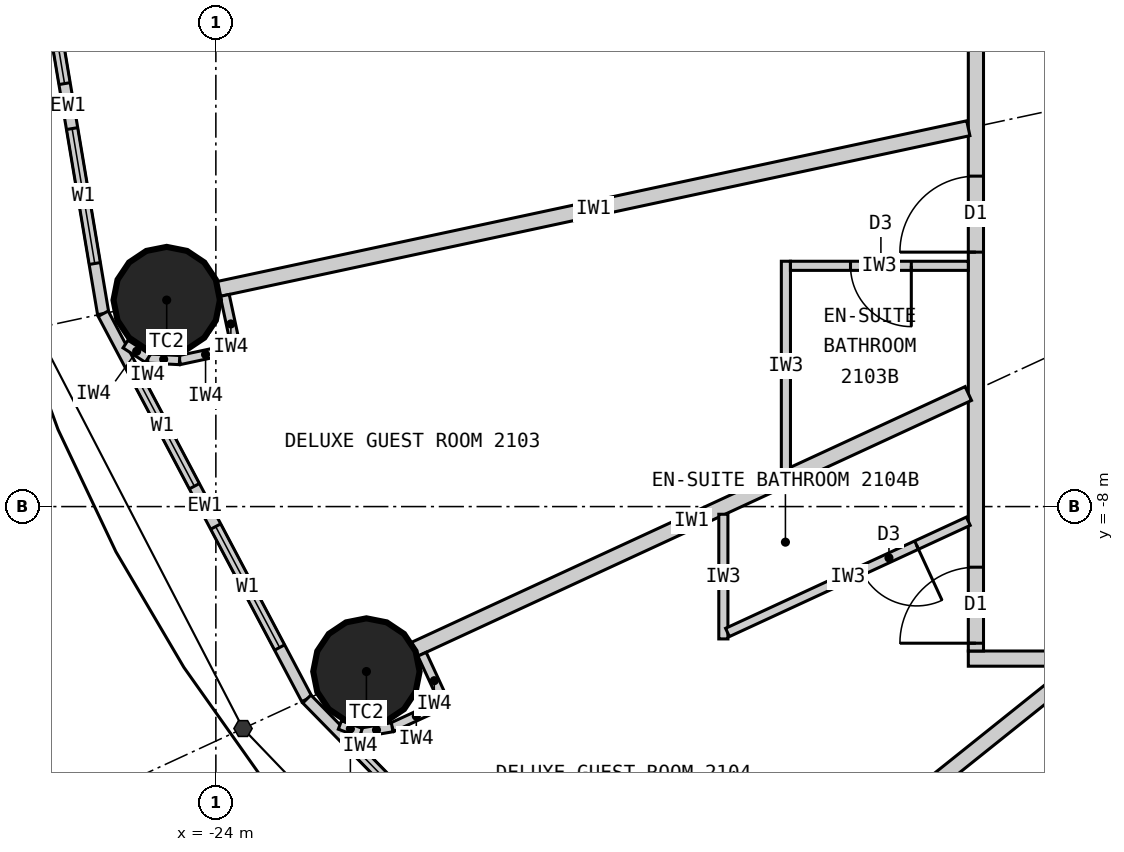
"""IFC4 building model, lengths in metres.
Left out: names, types, materials, properties, quantities, classifications, styles, units other than length and angle.
Written with IfcOpenShell. Run it as: python <this file> out.ifc"""

import sys

from ifc_helpers import new_model, si_unit, direction, frame, frame_2d, origin, origin_2d, place, context, subcontext, project, spatial, rectangle, circle, extrude, element, fill, save


model = new_model("IFC4")
c1 = context("Model", 3, precision=1e-05, world=origin(), true_north=direction((0.0, 1.0)))
c2 = subcontext(c1, "Body", "Model", "MODEL_VIEW")
j1 = project(units=[si_unit("LENGTHUNIT", "METRE"), si_unit("PLANEANGLEUNIT", "RADIAN")], contexts=[c1])
p1 = place(None, origin())
s1 = spatial("IfcSite", under=j1, at=p1, CompositionType="ELEMENT")
p2 = place(p1, origin())
s2 = spatial("IfcBuilding", under=s1, at=p2, CompositionType="ELEMENT")
p3 = place(p2, frame((0.0, 0.0, 83.7)))
s3 = spatial("IfcBuildingStorey", under=s2, at=p3, CompositionType="ELEMENT", Elevation=83.7)
for number, where, z_axis, x_axis in (
    (1, (-24.647, -5.283, 0.0), (0.0, 0.0, 1.0), (1.0, 0.0, 0.0)),
    (2, (-22.019, -10.17, 0.0), (0.0, 0.0, 1.0), (1.0, 0.0, 0.0)),
):
    element("IfcColumn", number, at=place(p3, frame(where, z_axis=z_axis, x_axis=x_axis)), inside=s3, PredefinedType="COLUMN", context=c2, shape_type="SweptSolid", body=[
        extrude(circle(Radius=0.7, at=origin_2d()), origin(), (0.0, 0.0, 1.0), 3.3),
    ])
p4 = place(p3, frame((-26.4, 0.0, 0.0), z_axis=(0.0, 0.0, 1.0), x_axis=(0.165642551694, -0.986185857264, 0.0)))
e3 = element("IfcWall", 3, at=p4, inside=s3, PredefinedType="ELEMENTEDWALL", context=c2, shape_type="SweptSolid", body=[
    extrude(rectangle(XDim=5.539, YDim=0.15, at=frame_2d((2.77, 0.0))), origin(), (0.0, 0.0, 1.0), 3.12),
])
p5 = place(p4, frame((0.669, 0.0, 0.9)))
e4 = element("IfcOpeningElement", 4, at=p5, cuts=e3, PredefinedType="OPENING", context=c2, shape_type="SweptSolid", body=[
    extrude(rectangle(XDim=1.8, YDim=1.9, at=frame_2d((0.9, 0.95))), frame((0.0, 0.085, 0.0), z_axis=(0.0, -1.0, 0.0), x_axis=(1.0, 0.0, 0.0)), (0.0, 0.0, 1.0), 0.17),
])
p6 = place(p4, frame((3.07, 0.0, 0.9)))
e5 = element("IfcOpeningElement", 5, at=p6, cuts=e3, PredefinedType="OPENING", context=c2, shape_type="SweptSolid", body=[
    extrude(rectangle(XDim=1.8, YDim=1.9, at=frame_2d((0.9, 0.95))), frame((0.0, 0.085, 0.0), z_axis=(0.0, -1.0, 0.0), x_axis=(1.0, 0.0, 0.0)), (0.0, 0.0, 1.0), 0.17),
])
p7 = place(p3, frame((-25.482, -5.462, 0.0), z_axis=(0.0, 0.0, 1.0), x_axis=(0.467296867008, -0.884100468321, 0.0)))
e6 = element("IfcWall", 6, at=p7, inside=s3, PredefinedType="ELEMENTEDWALL", context=c2, shape_type="SweptSolid", body=[
    extrude(rectangle(XDim=5.734, YDim=0.15, at=frame_2d((2.867, 0.0))), origin(), (0.0, 0.0, 1.0), 3.12),
])
p8 = place(p7, frame((0.767, 0.0, 0.9)))
e7 = element("IfcOpeningElement", 7, at=p8, cuts=e6, PredefinedType="OPENING", context=c2, shape_type="SweptSolid", body=[
    extrude(rectangle(XDim=1.8, YDim=1.9, at=frame_2d((0.9, 0.95))), frame((0.0, 0.085, 0.0), z_axis=(0.0, -1.0, 0.0), x_axis=(1.0, 0.0, 0.0)), (0.0, 0.0, 1.0), 0.17),
])
p9 = place(p7, frame((3.167, 0.0, 0.9)))
e8 = element("IfcOpeningElement", 8, at=p9, cuts=e6, PredefinedType="OPENING", context=c2, shape_type="SweptSolid", body=[
    extrude(rectangle(XDim=1.8, YDim=1.9, at=frame_2d((0.9, 0.95))), frame((0.0, 0.085, 0.0), z_axis=(0.0, -1.0, 0.0), x_axis=(1.0, 0.0, 0.0)), (0.0, 0.0, 1.0), 0.17),
])
p10 = place(p3, frame((-22.803, -10.532, 0.0), z_axis=(0.0, 0.0, 1.0), x_axis=(0.699602905915, -0.714531856557, 0.0)))
e9 = element("IfcWall", 9, at=p10, inside=s3, PredefinedType="ELEMENTEDWALL", context=c2, shape_type="SweptSolid", body=[
    extrude(rectangle(XDim=6.051, YDim=0.15, at=frame_2d((3.025, 0.0))), origin(), (0.0, 0.0, 1.0), 3.12),
])
p11 = place(p10, frame((0.926, 0.0, 0.9)))
e10 = element("IfcOpeningElement", 10, at=p11, cuts=e9, PredefinedType="OPENING", context=c2, shape_type="SweptSolid", body=[
    extrude(rectangle(XDim=1.8, YDim=1.9, at=frame_2d((0.9, 0.95))), frame((0.0, 0.085, 0.0), z_axis=(0.0, -1.0, 0.0), x_axis=(1.0, 0.0, 0.0)), (0.0, 0.0, 1.0), 0.17),
])
p12 = place(p10, frame((3.325, 0.0, 0.9)))
e11 = element("IfcOpeningElement", 11, at=p12, cuts=e9, PredefinedType="OPENING", context=c2, shape_type="SweptSolid", body=[
    extrude(rectangle(XDim=1.8, YDim=1.9, at=frame_2d((0.9, 0.95))), frame((0.0, 0.085, 0.0), z_axis=(0.0, -1.0, 0.0), x_axis=(1.0, 0.0, 0.0)), (0.0, 0.0, 1.0), 0.17),
])
p13 = place(p3, frame((14.1, -10.0, 0.0), z_axis=(0.0, 0.0, 1.0), x_axis=(-1.0, 0.0, 0.0)))
e12 = element("IfcWall", 12, at=p13, inside=s3, PredefinedType="PARTITIONING", context=c2, shape_type="SweptSolid", body=[
    extrude(rectangle(XDim=28.2, YDim=0.2, at=frame_2d((14.1, 0.0))), origin(), (0.0, 0.0, 1.0), 3.12),
])
p14 = place(p13, frame((23.865, 0.0, 0.0)))
e13 = element("IfcOpeningElement", 13, at=p14, cuts=e12, PredefinedType="OPENING", context=c2, shape_type="SweptSolid", body=[
    extrude(rectangle(XDim=1.0, YDim=2.2, at=frame_2d((0.5, 1.1))), frame((0.0, 0.11, 0.0), z_axis=(0.0, -1.0, 0.0), x_axis=(1.0, 0.0, 0.0)), (0.0, 0.0, 1.0), 0.22),
])
p15 = place(p13, frame((18.529, 0.0, 0.0)))
e14 = element("IfcOpeningElement", 14, at=p15, cuts=e12, PredefinedType="OPENING", context=c2, shape_type="SweptSolid", body=[
    extrude(rectangle(XDim=1.0, YDim=2.2, at=frame_2d((0.5, 1.1))), frame((0.0, 0.11, 0.0), z_axis=(0.0, -1.0, 0.0), x_axis=(1.0, 0.0, 0.0)), (0.0, 0.0, 1.0), 0.22),
])
p16 = place(p13, frame((14.923, 0.0, 0.0)))
e15 = element("IfcOpeningElement", 15, at=p16, cuts=e12, PredefinedType="OPENING", context=c2, shape_type="SweptSolid", body=[
    extrude(rectangle(XDim=1.0, YDim=2.2, at=frame_2d((0.5, 1.1))), frame((0.0, 0.11, 0.0), z_axis=(0.0, -1.0, 0.0), x_axis=(1.0, 0.0, 0.0)), (0.0, 0.0, 1.0), 0.22),
])
p17 = place(p13, frame((2.801, 0.0, 0.0)))
e16 = element("IfcOpeningElement", 16, at=p17, cuts=e12, PredefinedType="OPENING", context=c2, shape_type="SweptSolid", body=[
    extrude(rectangle(XDim=1.0, YDim=2.2, at=frame_2d((0.5, 1.1))), frame((0.0, 0.11, 0.0), z_axis=(0.0, -1.0, 0.0), x_axis=(1.0, 0.0, 0.0)), (0.0, 0.0, 1.0), 0.22),
])
p18 = place(p3, frame((-14.0, 9.9, 0.0), z_axis=(0.0, 0.0, 1.0), x_axis=(0.0, -1.0, 0.0)))
e17 = element("IfcWall", 17, at=p18, inside=s3, PredefinedType="PARTITIONING", context=c2, shape_type="SweptSolid", body=[
    extrude(rectangle(XDim=19.8, YDim=0.2, at=frame_2d((9.9, 0.0))), origin(), (0.0, 0.0, 1.0), 3.12),
])
p19 = place(p18, frame((7.097, 0.0, 0.0)))
e18 = element("IfcOpeningElement", 18, at=p19, cuts=e17, PredefinedType="OPENING", context=c2, shape_type="SweptSolid", body=[
    extrude(rectangle(XDim=1.0, YDim=2.2, at=frame_2d((0.5, 1.1))), frame((0.0, 0.11, 0.0), z_axis=(0.0, -1.0, 0.0), x_axis=(1.0, 0.0, 0.0)), (0.0, 0.0, 1.0), 0.22),
])
p20 = place(p18, frame((10.778, 0.0, 0.0)))
e19 = element("IfcOpeningElement", 19, at=p20, cuts=e17, PredefinedType="OPENING", context=c2, shape_type="SweptSolid", body=[
    extrude(rectangle(XDim=1.0, YDim=2.2, at=frame_2d((0.5, 1.1))), frame((0.0, 0.11, 0.0), z_axis=(0.0, -1.0, 0.0), x_axis=(1.0, 0.0, 0.0)), (0.0, 0.0, 1.0), 0.22),
])
p21 = place(p18, frame((13.552, 0.0, 0.0)))
e20 = element("IfcOpeningElement", 20, at=p21, cuts=e17, PredefinedType="OPENING", context=c2, shape_type="SweptSolid", body=[
    extrude(rectangle(XDim=1.0, YDim=2.2, at=frame_2d((0.5, 1.1))), frame((0.0, 0.11, 0.0), z_axis=(0.0, -1.0, 0.0), x_axis=(1.0, 0.0, 0.0)), (0.0, 0.0, 1.0), 0.22),
])
p22 = place(p18, frame((18.698, 0.0, 0.0)))
e21 = element("IfcOpeningElement", 21, at=p22, cuts=e17, PredefinedType="OPENING", context=c2, shape_type="SweptSolid", body=[
    extrude(rectangle(XDim=1.0, YDim=2.2, at=frame_2d((0.5, 1.1))), frame((0.0, 0.11, 0.0), z_axis=(0.0, -1.0, 0.0), x_axis=(1.0, 0.0, 0.0)), (0.0, 0.0, 1.0), 0.22),
])
p23 = place(p18, frame((1.877, 0.0, 0.0)))
e22 = element("IfcOpeningElement", 22, at=p23, cuts=e17, PredefinedType="OPENING", context=c2, shape_type="SweptSolid", body=[
    extrude(rectangle(XDim=1.0, YDim=2.2, at=frame_2d((0.5, 1.1))), frame((0.0, 0.11, 0.0), z_axis=(0.0, -1.0, 0.0), x_axis=(1.0, 0.0, 0.0)), (0.0, 0.0, 1.0), 0.22),
])
p24 = place(p3, frame((-14.1, -3.022, 0.0), z_axis=(0.0, 0.0, 1.0), x_axis=(-0.977790014929, -0.209586943072, 0.0)))
e23 = element("IfcWall", 23, at=p24, inside=s3, PredefinedType="PARTITIONING", context=c2, shape_type="SweptSolid", body=[
    extrude(rectangle(XDim=10.087, YDim=0.2, at=frame_2d((5.043, 0.0))), origin(), (0.0, 0.0, 1.0), 2.32),
])
p25 = place(p3, frame((-14.1, -6.512, 0.0), z_axis=(0.0, 0.0, 1.0), x_axis=(-0.907832871056, -0.419332181247, 0.0)))
e24 = element("IfcWall", 24, at=p25, inside=s3, PredefinedType="PARTITIONING", context=c2, shape_type="SweptSolid", body=[
    extrude(rectangle(XDim=8.023, YDim=0.2, at=frame_2d((4.011, 0.0))), origin(), (0.0, 0.0, 1.0), 2.32),
])
p26 = place(p3, frame((-12.625, -10.1, 0.0), z_axis=(0.0, 0.0, 1.0), x_axis=(-0.780892451574, -0.624665493744, 0.0)))
e25 = element("IfcWall", 25, at=p26, inside=s3, PredefinedType="PARTITIONING", context=c2, shape_type="SweptSolid", body=[
    extrude(rectangle(XDim=6.045, YDim=0.2, at=frame_2d((3.022, 0.0))), origin(), (0.0, 0.0, 1.0), 2.32),
])
p27 = place(p3, frame((-16.5, -7.521, 0.0), z_axis=(0.0, 0.0, 1.0), x_axis=(0.0, 1.0, 0.0)))
e26 = element("IfcWall", 26, at=p27, inside=s3, PredefinedType="PARTITIONING", context=c2, shape_type="SweptSolid", body=[
    extrude(rectangle(XDim=2.749, YDim=0.12, at=frame_2d((1.374, 0.0))), origin(), (0.0, 0.0, 1.0), 3.12),
])
p28 = place(p3, frame((-14.1, -4.833, 0.0), z_axis=(0.0, 0.0, 1.0), x_axis=(-1.0, 0.0, 0.0)))
e27 = element("IfcWall", 27, at=p28, inside=s3, PredefinedType="PARTITIONING", context=c2, shape_type="SweptSolid", body=[
    extrude(rectangle(XDim=2.34, YDim=0.12, at=frame_2d((1.17, 0.0))), origin(), (0.0, 0.0, 1.0), 3.12),
])
p29 = place(p28, frame((0.75, 0.0, 0.0)))
e28 = element("IfcOpeningElement", 28, at=p29, cuts=e27, PredefinedType="OPENING", context=c2, shape_type="SweptSolid", body=[
    extrude(rectangle(XDim=0.8, YDim=2.1, at=frame_2d((0.4, 1.05))), frame((0.0, 0.07, 0.0), z_axis=(0.0, -1.0, 0.0), x_axis=(1.0, 0.0, 0.0)), (0.0, 0.0, 1.0), 0.14),
])
p30 = place(p3, frame((-17.323, -8.101, 0.0), z_axis=(0.0, 0.0, 1.0), x_axis=(0.0, -1.0, 0.0)))
e29 = element("IfcWall", 29, at=p30, inside=s3, PredefinedType="PARTITIONING", context=c2, shape_type="SweptSolid", body=[
    extrude(rectangle(XDim=1.64, YDim=0.12, at=frame_2d((0.82, 0.0))), origin(), (0.0, 0.0, 1.0), 3.12),
])
p31 = place(p3, frame((-14.1, -8.193, 0.0), z_axis=(0.0, 0.0, 1.0), x_axis=(-0.907836493557, -0.419324338628, 0.0)))
e30 = element("IfcWall", 30, at=p31, inside=s3, PredefinedType="PARTITIONING", context=c2, shape_type="SweptSolid", body=[
    extrude(rectangle(XDim=3.49, YDim=0.12, at=frame_2d((1.745, 0.0))), origin(), (0.0, 0.0, 1.0), 3.12),
])
p32 = place(p31, frame((0.75, 0.0, 0.0)))
e31 = element("IfcOpeningElement", 31, at=p32, cuts=e30, PredefinedType="OPENING", context=c2, shape_type="SweptSolid", body=[
    extrude(rectangle(XDim=0.8, YDim=2.1, at=frame_2d((0.4, 1.05))), frame((0.0, 0.07, 0.0), z_axis=(0.0, -1.0, 0.0), x_axis=(1.0, 0.0, 0.0)), (0.0, 0.0, 1.0), 0.14),
])
p33 = place(p3, frame((-23.883, -5.222, 0.0), z_axis=(0.0, 0.0, 1.0), x_axis=(0.209311842415, -0.977848941619, 0.0)))
e32 = element("IfcWall", 32, at=p33, inside=s3, PredefinedType="PARTITIONING", context=c2, shape_type="SweptSolid", body=[
    extrude(rectangle(XDim=0.768, YDim=0.12, at=frame_2d((0.384, 0.0))), origin(), (0.0, 0.0, 1.0), 3.12),
])
p34 = place(p3, frame((-23.793, -5.926, 0.0), z_axis=(0.0, 0.0, 1.0), x_axis=(-0.977792206673, -0.209576717621, 0.0)))
e33 = element("IfcWall", 33, at=p34, inside=s3, PredefinedType="PARTITIONING", context=c2, shape_type="SweptSolid", body=[
    extrude(rectangle(XDim=0.7, YDim=0.12, at=frame_2d((0.35, 0.0))), origin(), (0.0, 0.0, 1.0), 3.12),
])
p35 = place(p3, frame((-24.478, -6.073, 0.0), z_axis=(0.0, 0.0, 1.0), x_axis=(-0.998708262812, 0.05081147302, 0.0)))
e34 = element("IfcWall", 34, at=p35, inside=s3, PredefinedType="PARTITIONING", context=c2, shape_type="SweptSolid", body=[
    extrude(rectangle(XDim=0.418, YDim=0.12, at=frame_2d((0.209, 0.0))), origin(), (0.0, 0.0, 1.0), 3.12),
])
p36 = place(p3, frame((-24.895, -6.052, 0.0), z_axis=(0.0, 0.0, 1.0), x_axis=(-0.839495197275, 0.54336710772, 0.0)))
e35 = element("IfcWall", 35, at=p36, inside=s3, PredefinedType="PARTITIONING", context=c2, shape_type="SweptSolid", body=[
    extrude(rectangle(XDim=0.35, YDim=0.12, at=frame_2d((0.175, 0.0))), origin(), (0.0, 0.0, 1.0), 3.12),
])
p37 = place(p3, frame((-21.287, -9.942, 0.0), z_axis=(0.0, 0.0, 1.0), x_axis=(0.419259891039, -0.907866258744, 0.0)))
e36 = element("IfcWall", 36, at=p37, inside=s3, PredefinedType="PARTITIONING", context=c2, shape_type="SweptSolid", body=[
    extrude(rectangle(XDim=0.768, YDim=0.12, at=frame_2d((0.384, 0.0))), origin(), (0.0, 0.0, 1.0), 3.12),
])
p38 = place(p3, frame((-21.045, -10.61, 0.0), z_axis=(0.0, 0.0, 1.0), x_axis=(-0.907877701396, -0.419235112208, 0.0)))
e37 = element("IfcWall", 37, at=p38, inside=s3, PredefinedType="PARTITIONING", context=c2, shape_type="SweptSolid", body=[
    extrude(rectangle(XDim=0.7, YDim=0.12, at=frame_2d((0.35, 0.0))), origin(), (0.0, 0.0, 1.0), 3.12),
])
p39 = place(p3, frame((-21.68, -10.903, 0.0), z_axis=(0.0, 0.0, 1.0), x_axis=(-0.985446622073, -0.169985161247, 0.0)))
e38 = element("IfcWall", 38, at=p39, inside=s3, PredefinedType="PARTITIONING", context=c2, shape_type="SweptSolid", body=[
    extrude(rectangle(XDim=0.418, YDim=0.12, at=frame_2d((0.209, 0.0))), origin(), (0.0, 0.0, 1.0), 3.12),
])
p40 = place(p3, frame((-22.092, -10.974, 0.0), z_axis=(0.0, 0.0, 1.0), x_axis=(-0.938428160676, 0.345474437912, 0.0)))
e39 = element("IfcWall", 39, at=p40, inside=s3, PredefinedType="PARTITIONING", context=c2, shape_type="SweptSolid", body=[
    extrude(rectangle(XDim=0.294, YDim=0.12, at=frame_2d((0.147, 0.0))), origin(), (0.0, 0.0, 1.0), 3.12),
])
p41 = place(p5, origin())
e40 = element("IfcWindow", 40, at=p41, inside=s3, PartitioningType="SINGLE_PANEL", PredefinedType="WINDOW", context=c2, shape_type="SweptSolid", body=[
    extrude(rectangle(XDim=1.8, YDim=1.9, at=frame_2d((0.9, 0.95))), frame((0.0, 0.03, 0.0), z_axis=(0.0, -1.0, 0.0), x_axis=(1.0, 0.0, 0.0)), (0.0, 0.0, 1.0), 0.06),
])
fill(e4, e40)
p42 = place(p6, origin())
e41 = element("IfcWindow", 41, at=p42, inside=s3, PartitioningType="SINGLE_PANEL", PredefinedType="WINDOW", context=c2, shape_type="SweptSolid", body=[
    extrude(rectangle(XDim=1.8, YDim=1.9, at=frame_2d((0.9, 0.95))), frame((0.0, 0.03, 0.0), z_axis=(0.0, -1.0, 0.0), x_axis=(1.0, 0.0, 0.0)), (0.0, 0.0, 1.0), 0.06),
])
fill(e5, e41)
p43 = place(p8, origin())
e42 = element("IfcWindow", 42, at=p43, inside=s3, PartitioningType="SINGLE_PANEL", PredefinedType="WINDOW", context=c2, shape_type="SweptSolid", body=[
    extrude(rectangle(XDim=1.8, YDim=1.9, at=frame_2d((0.9, 0.95))), frame((0.0, 0.03, 0.0), z_axis=(0.0, -1.0, 0.0), x_axis=(1.0, 0.0, 0.0)), (0.0, 0.0, 1.0), 0.06),
])
fill(e7, e42)
p44 = place(p9, origin())
e43 = element("IfcWindow", 43, at=p44, inside=s3, PartitioningType="SINGLE_PANEL", PredefinedType="WINDOW", context=c2, shape_type="SweptSolid", body=[
    extrude(rectangle(XDim=1.8, YDim=1.9, at=frame_2d((0.9, 0.95))), frame((0.0, 0.03, 0.0), z_axis=(0.0, -1.0, 0.0), x_axis=(1.0, 0.0, 0.0)), (0.0, 0.0, 1.0), 0.06),
])
fill(e8, e43)
p45 = place(p11, origin())
e44 = element("IfcWindow", 44, at=p45, inside=s3, PartitioningType="SINGLE_PANEL", PredefinedType="WINDOW", context=c2, shape_type="SweptSolid", body=[
    extrude(rectangle(XDim=1.8, YDim=1.9, at=frame_2d((0.9, 0.95))), frame((0.0, 0.03, 0.0), z_axis=(0.0, -1.0, 0.0), x_axis=(1.0, 0.0, 0.0)), (0.0, 0.0, 1.0), 0.06),
])
fill(e10, e44)
p46 = place(p29, origin())
e45 = element("IfcDoor", 45, at=p46, inside=s3, OperationType="SINGLE_SWING_LEFT", PredefinedType="DOOR", context=c2, shape_type="SweptSolid", body=[
    extrude(rectangle(XDim=0.8, YDim=2.1, at=frame_2d((0.4, 1.05))), frame((0.0, 0.025, 0.0), z_axis=(0.0, -1.0, 0.0), x_axis=(1.0, 0.0, 0.0)), (0.0, 0.0, 1.0), 0.05),
])
fill(e28, e45)
p47 = place(p21, origin())
e46 = element("IfcDoor", 46, at=p47, inside=s3, OperationType="SINGLE_SWING_RIGHT", PredefinedType="DOOR", context=c2, shape_type="SweptSolid", body=[
    extrude(rectangle(XDim=1.0, YDim=2.2, at=frame_2d((0.5, 1.1))), frame((0.0, 0.025, 0.0), z_axis=(0.0, -1.0, 0.0), x_axis=(1.0, 0.0, 0.0)), (0.0, 0.0, 1.0), 0.05),
])
fill(e20, e46)
p48 = place(p32, origin())
e47 = element("IfcDoor", 47, at=p48, inside=s3, OperationType="SINGLE_SWING_LEFT", PredefinedType="DOOR", context=c2, shape_type="SweptSolid", body=[
    extrude(rectangle(XDim=0.8, YDim=2.1, at=frame_2d((0.4, 1.05))), frame((0.0, 0.025, 0.0), z_axis=(0.0, -1.0, 0.0), x_axis=(1.0, 0.0, 0.0)), (0.0, 0.0, 1.0), 0.05),
])
fill(e31, e47)
p49 = place(p22, origin())
e48 = element("IfcDoor", 48, at=p49, inside=s3, OperationType="SINGLE_SWING_RIGHT", PredefinedType="DOOR", context=c2, shape_type="SweptSolid", body=[
    extrude(rectangle(XDim=1.0, YDim=2.2, at=frame_2d((0.5, 1.1))), frame((0.0, 0.025, 0.0), z_axis=(0.0, -1.0, 0.0), x_axis=(1.0, 0.0, 0.0)), (0.0, 0.0, 1.0), 0.05),
])
fill(e21, e48)
save(model, sys.argv[1])
